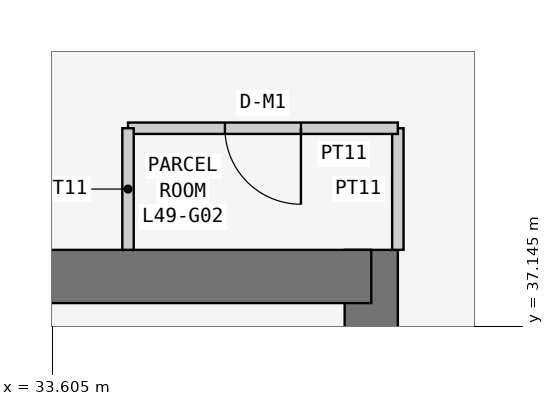
"""IFC4 building model, lengths in metres.
Left out: names, types, materials, properties, quantities, classifications, styles, units other than length and angle.
Written with IfcOpenShell. Run it as: python <this file> out.ifc"""

import sys

from ifc_helpers import new_model, si_unit, direction, frame, frame_2d, origin, place, context, subcontext, project, spatial, rectangle, extrude, element, fill, save


model = new_model("IFC4")
c1 = context("Model", 3, precision=1e-05, world=origin(), true_north=direction((0.0, 1.0)))
c2 = subcontext(c1, "Body", "Model", "MODEL_VIEW")
j1 = project(units=[si_unit("LENGTHUNIT", "METRE"), si_unit("PLANEANGLEUNIT", "RADIAN")], contexts=[c1])
p1 = place(None, origin())
s1 = spatial("IfcSite", under=j1, at=p1, CompositionType="ELEMENT")
p2 = place(p1, origin())
s2 = spatial("IfcBuilding", under=s1, at=p2, CompositionType="ELEMENT")
p3 = place(p2, frame((0.0, 0.0, 190.5)))
s3 = spatial("IfcBuildingStorey", under=s2, at=p3, CompositionType="ELEMENT", Elevation=190.5)
p4 = place(p3, frame((37.8, 21.0, 0.0), z_axis=(0.0, 0.0, 1.0), x_axis=(0.0, 1.0, 0.0)))
e1 = element("IfcWall", 1, at=p4, inside=s3, PredefinedType="SHEAR", context=c2, shape_type="SweptSolid", body=[
    extrude(rectangle(XDim=17.15, YDim=0.7, at=frame_2d((8.575, 0.0))), origin(), (0.0, 0.0, 1.0), 3.6),
])
p5 = place(p4, frame((5.2, 0.0, 0.0)))
e2 = element("IfcOpeningElement", 2, at=p5, cuts=e1, PredefinedType="OPENING", context=c2, shape_type="SweptSolid", body=[
    extrude(rectangle(XDim=1.2, YDim=2.1, at=frame_2d((0.6, 1.05))), frame((0.0, 0.36, 0.0), z_axis=(0.0, -1.0, 0.0), x_axis=(1.0, 0.0, 0.0)), (0.0, 0.0, 1.0), 0.72),
])
p6 = place(p3, frame((37.8, 37.8, 0.0), z_axis=(0.0, 0.0, 1.0), x_axis=(-1.0, 0.0, 0.0)))
e3 = element("IfcWall", 3, at=p6, inside=s3, PredefinedType="SHEAR", context=c2, shape_type="SweptSolid", body=[
    extrude(rectangle(XDim=17.15, YDim=0.7, at=frame_2d((8.575, 0.0))), origin(), (0.0, 0.0, 1.0), 3.6),
])
p7 = place(p3, frame((38.15, 38.15, 0.0), z_axis=(0.0, 0.0, 1.0), x_axis=(0.0, 1.0, 0.0)))
e4 = element("IfcWall", 4, at=p7, inside=s3, PredefinedType="PARTITIONING", context=c2, shape_type="SweptSolid", body=[
    extrude(rectangle(XDim=1.6, YDim=0.15, at=frame_2d((0.8, 0.0))), origin(), (0.0, 0.0, 1.0), 3.45),
])
p8 = place(p3, frame((38.15, 39.75, 0.0), z_axis=(0.0, 0.0, 1.0), x_axis=(-1.0, 0.0, 0.0)))
e5 = element("IfcWall", 5, at=p8, inside=s3, PredefinedType="PARTITIONING", context=c2, shape_type="SweptSolid", body=[
    extrude(rectangle(XDim=3.55, YDim=0.15, at=frame_2d((1.775, 0.0))), origin(), (0.0, 0.0, 1.0), 3.45),
])
p9 = place(p8, frame((1.275, 0.0, 0.0)))
e6 = element("IfcOpeningElement", 6, at=p9, cuts=e5, PredefinedType="OPENING", context=c2, shape_type="SweptSolid", body=[
    extrude(rectangle(XDim=1.0, YDim=2.1, at=frame_2d((0.5, 1.05))), frame((0.0, 0.085, 0.0), z_axis=(0.0, -1.0, 0.0), x_axis=(1.0, 0.0, 0.0)), (0.0, 0.0, 1.0), 0.17),
])
p10 = place(p3, frame((34.6, 39.75, 0.0), z_axis=(0.0, 0.0, 1.0), x_axis=(0.0, -1.0, 0.0)))
e7 = element("IfcWall", 7, at=p10, inside=s3, PredefinedType="PARTITIONING", context=c2, shape_type="SweptSolid", body=[
    extrude(rectangle(XDim=1.6, YDim=0.15, at=frame_2d((0.8, 0.0))), origin(), (0.0, 0.0, 1.0), 3.45),
])
p11 = place(p9, origin())
e8 = element("IfcDoor", 8, at=p11, inside=s3, OperationType="SINGLE_SWING_LEFT", PredefinedType="DOOR", context=c2, shape_type="SweptSolid", body=[
    extrude(rectangle(XDim=1.0, YDim=2.1, at=frame_2d((0.5, 1.05))), frame((0.0, 0.025, 0.0), z_axis=(0.0, -1.0, 0.0), x_axis=(1.0, 0.0, 0.0)), (0.0, 0.0, 1.0), 0.05),
])
fill(e6, e8)
save(model, sys.argv[1])
